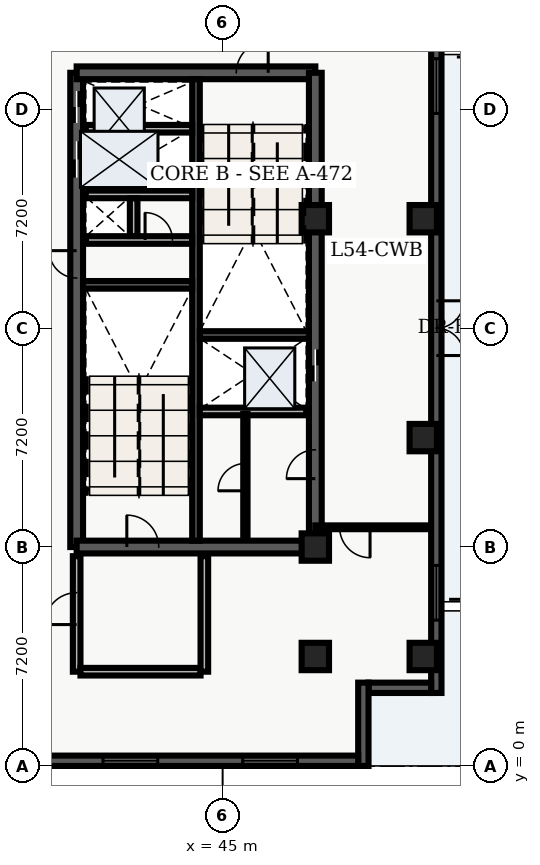
"""IFC4 building model, lengths in metres.
Left out: names, types, materials, properties, quantities, classifications, styles, units other than length and angle.
Written with IfcOpenShell. Run it as: python <this file> out.ifc"""

import sys

from ifc_helpers import new_model, entity, si_unit, converted_unit, direction, frame, origin_with_axes, origin_2d_with_axis, place, context, subcontext, project, spatial, polyline, rectangle, outline, extrude, element, fill, save


model = new_model("IFC4")
c1 = context("Model", 3, precision=1e-05, world=origin_with_axes(), true_north=direction((0.0, 1.0)))
c2 = subcontext(c1, "Body", "Model", "MODEL_VIEW")
j1 = project(units=[si_unit("LENGTHUNIT", "METRE"), converted_unit("PLANEANGLEUNIT", "DEGREE", entity("IfcPlaneAngleMeasure", 0.017), si_unit("PLANEANGLEUNIT", "RADIAN"), dimensions=[0, 0, 0, 0, 0, 0, 0])], contexts=[c1])
p1 = place(None, origin_with_axes())
s1 = spatial("IfcSite", under=j1, at=p1, CompositionType="ELEMENT")
p2 = place(p1, origin_with_axes())
s2 = spatial("IfcBuilding", under=s1, at=p2, CompositionType="ELEMENT")
p3 = place(p2, frame((0.0, 0.0, 219.9), z_axis=(0.0, 0.0, 1.0), x_axis=(1.0, 0.0, 0.0)))
s3 = spatial("IfcBuildingStorey", under=s2, at=p3, CompositionType="ELEMENT", Elevation=219.9)
p4 = place(p3, frame((40.2, 7.2, 0.0), z_axis=(0.0, 0.0, 1.0), x_axis=(0.0, 1.0, 0.0)))
e1 = element("IfcWall", 1, at=p4, inside=s3, PredefinedType="SHEAR", context=c2, shape_type="SweptSolid", body=[
    extrude(outline(polyline([(0.0, -0.21), (15.6, -0.21), (15.6, 0.21), (0.0, 0.21), (0.0, -0.21)])), origin_with_axes(), (0.0, 0.0, 1.0), 4.56),
])
p5 = place(p4, frame((14.475, 0.0, 0.0), z_axis=(0.0, 0.0, 1.0), x_axis=(1.0, 0.0, 0.0)))
e2 = element("IfcOpeningElement", 2, at=p5, cuts=e1, PredefinedType="OPENING", context=c2, shape_type="SweptSolid", body=[
    extrude(rectangle(XDim=1.05, YDim=0.44, at=origin_2d_with_axis()), origin_with_axes(), (0.0, 0.0, 1.0), 2.15),
])
p6 = place(p4, frame((12.75, 0.0, 0.0), z_axis=(0.0, 0.0, 1.0), x_axis=(1.0, 0.0, 0.0)))
e3 = element("IfcOpeningElement", 3, at=p6, cuts=e1, PredefinedType="OPENING", context=c2, shape_type="SweptSolid", body=[
    extrude(rectangle(XDim=1.2, YDim=0.44, at=origin_2d_with_axis()), origin_with_axes(), (0.0, 0.0, 1.0), 2.15),
])
p7 = place(p4, frame((9.3, 0.0, 0.0), z_axis=(0.0, 0.0, 1.0), x_axis=(1.0, 0.0, 0.0)))
e4 = element("IfcOpeningElement", 4, at=p7, cuts=e1, PredefinedType="OPENING", context=c2, shape_type="SweptSolid", body=[
    extrude(rectangle(XDim=0.9, YDim=0.44, at=origin_2d_with_axis()), origin_with_axes(), (0.0, 0.0, 1.0), 2.15),
])
p8 = place(p3, frame((40.2, 7.2, 0.0), z_axis=(0.0, 0.0, 1.0), x_axis=(1.0, 0.0, 0.0)))
e5 = element("IfcWall", 5, at=p8, inside=s3, PredefinedType="SHEAR", context=c2, shape_type="SweptSolid", body=[
    extrude(outline(polyline([(0.0, -0.21), (7.85, -0.21), (7.85, 0.21), (0.0, 0.21), (0.0, -0.21)])), origin_with_axes(), (0.0, 0.0, 1.0), 4.56),
])
p9 = place(p8, frame((2.175, 0.0, 0.0), z_axis=(0.0, 0.0, 1.0), x_axis=(1.0, 0.0, 0.0)))
e6 = element("IfcOpeningElement", 6, at=p9, cuts=e5, PredefinedType="OPENING", context=c2, shape_type="SweptSolid", body=[
    extrude(rectangle(XDim=1.05, YDim=0.44, at=origin_2d_with_axis()), origin_with_axes(), (0.0, 0.0, 1.0), 2.15),
])
p10 = place(p3, frame((40.2, 22.8, 0.0), z_axis=(0.0, 0.0, 1.0), x_axis=(1.0, 0.0, 0.0)))
e7 = element("IfcWall", 7, at=p10, inside=s3, PredefinedType="SHEAR", context=c2, shape_type="SweptSolid", body=[
    extrude(outline(polyline([(0.0, -0.21), (7.85, -0.21), (7.85, 0.21), (0.0, 0.21), (0.0, -0.21)])), origin_with_axes(), (0.0, 0.0, 1.0), 4.56),
])
p11 = place(p10, frame((5.775, 0.0, 0.0), z_axis=(0.0, 0.0, 1.0), x_axis=(1.0, 0.0, 0.0)))
e8 = element("IfcOpeningElement", 8, at=p11, cuts=e7, PredefinedType="OPENING", context=c2, shape_type="SweptSolid", body=[
    extrude(rectangle(XDim=1.05, YDim=0.44, at=origin_2d_with_axis()), origin_with_axes(), (0.0, 0.0, 1.0), 2.15),
])
p12 = place(p3, frame((48.05, 7.2, 0.0), z_axis=(0.0, 0.0, 1.0), x_axis=(0.0, 1.0, 0.0)))
e9 = element("IfcWall", 9, at=p12, inside=s3, PredefinedType="SHEAR", context=c2, shape_type="SweptSolid", body=[
    extrude(outline(polyline([(0.0, -0.21), (15.6, -0.21), (15.6, 0.21), (0.0, 0.21), (0.0, -0.21)])), origin_with_axes(), (0.0, 0.0, 1.0), 4.56),
])
p13 = place(p12, frame((5.975, 0.0, 0.0), z_axis=(0.0, 0.0, 1.0), x_axis=(1.0, 0.0, 0.0)))
e10 = element("IfcOpeningElement", 10, at=p13, cuts=e9, PredefinedType="OPENING", context=c2, shape_type="SweptSolid", body=[
    extrude(rectangle(XDim=1.05, YDim=0.44, at=origin_2d_with_axis()), origin_with_axes(), (0.0, 0.0, 1.0), 2.15),
])
p14 = place(p12, frame((2.725, 0.0, 0.0), z_axis=(0.0, 0.0, 1.0), x_axis=(1.0, 0.0, 0.0)))
e11 = element("IfcOpeningElement", 11, at=p14, cuts=e9, PredefinedType="OPENING", context=c2, shape_type="SweptSolid", body=[
    extrude(rectangle(XDim=0.95, YDim=0.44, at=origin_2d_with_axis()), origin_with_axes(), (0.0, 0.0, 1.0), 2.15),
])
p15 = place(p3, frame((44.125, 7.41, 0.0), z_axis=(0.0, 0.0, 1.0), x_axis=(0.0, 1.0, 0.0)))
e12 = element("IfcWall", 12, at=p15, inside=s3, PredefinedType="SHEAR", context=c2, shape_type="SweptSolid", body=[
    extrude(outline(polyline([(0.0, -0.125), (15.18, -0.125), (15.18, 0.125), (0.0, 0.125), (0.0, -0.125)])), origin_with_axes(), (0.0, 0.0, 1.0), 4.56),
])
for number, where, z_axis, x_axis in (
    (13, (40.41, 15.825, 0.0), (0.0, 0.0, 1.0), (1.0, 0.0, 0.0)),
    (14, (44.25, 14.175, 0.0), (0.0, 0.0, 1.0), (1.0, 0.0, 0.0)),
):
    element("IfcWall", number, at=place(p3, frame(where, z_axis=z_axis, x_axis=x_axis)), inside=s3, PredefinedType="SHEAR", context=c2, shape_type="SweptSolid", body=[
        extrude(outline(polyline([(0.0, -0.125), (3.59, -0.125), (3.59, 0.125), (0.0, 0.125), (0.0, -0.125)])), origin_with_axes(), (0.0, 0.0, 1.0), 4.56),
    ])
p16 = place(p3, frame((40.5, 17.3, 0.0), z_axis=(0.0, 0.0, 1.0), x_axis=(1.0, 0.0, 0.0)))
e15 = element("IfcWall", 15, at=p16, inside=s3, PredefinedType="SOLIDWALL", context=c2, shape_type="SweptSolid", body=[
    extrude(outline(polyline([(0.0, -0.125), (3.5, -0.125), (3.5, 0.125), (0.0, 0.125), (0.0, -0.125)])), origin_with_axes(), (0.0, 0.0, 1.0), 3.6),
])
p17 = place(p16, frame((2.4, 0.0, 0.0), z_axis=(0.0, 0.0, 1.0), x_axis=(1.0, 0.0, 0.0)))
e16 = element("IfcOpeningElement", 16, at=p17, cuts=e15, PredefinedType="OPENING", context=c2, shape_type="SweptSolid", body=[
    extrude(rectangle(XDim=0.9, YDim=0.27, at=origin_2d_with_axis()), origin_with_axes(), (0.0, 0.0, 1.0), 2.15),
])
p18 = place(p3, frame((40.5, 18.8, 0.0), z_axis=(0.0, 0.0, 1.0), x_axis=(1.0, 0.0, 0.0)))
e17 = element("IfcWall", 17, at=p18, inside=s3, PredefinedType="SOLIDWALL", context=c2, shape_type="SweptSolid", body=[
    extrude(outline(polyline([(0.0, -0.125), (3.5, -0.125), (3.5, 0.125), (0.0, 0.125), (0.0, -0.125)])), origin_with_axes(), (0.0, 0.0, 1.0), 3.6),
])
p19 = place(p3, frame((42.075, 17.43, 0.0), z_axis=(0.0, 0.0, 1.0), x_axis=(0.0, 1.0, 0.0)))
e18 = element("IfcWall", 18, at=p19, inside=s3, PredefinedType="SOLIDWALL", context=c2, shape_type="SweptSolid", body=[
    extrude(outline(polyline([(0.0, -0.125), (1.24, -0.125), (1.24, 0.125), (0.0, 0.125), (0.0, -0.125)])), origin_with_axes(), (0.0, 0.0, 1.0), 3.6),
])
p20 = place(p3, frame((40.2, 3.1, 0.0), z_axis=(0.0, 0.0, 1.0), x_axis=(0.0, 1.0, 0.0)))
e19 = element("IfcWall", 19, at=p20, inside=s3, PredefinedType="SOLIDWALL", context=c2, shape_type="SweptSolid", body=[
    extrude(outline(polyline([(0.0, -0.125), (3.8, -0.125), (3.8, 0.125), (0.0, 0.125), (0.0, -0.125)])), origin_with_axes(), (0.0, 0.0, 1.0), 3.6),
])
p21 = place(p20, frame((2.075, 0.0, 0.0), z_axis=(0.0, 0.0, 1.0), x_axis=(1.0, 0.0, 0.0)))
e20 = element("IfcOpeningElement", 20, at=p21, cuts=e19, PredefinedType="OPENING", context=c2, shape_type="SweptSolid", body=[
    extrude(rectangle(XDim=1.05, YDim=0.27, at=origin_2d_with_axis()), origin_with_axes(), (0.0, 0.0, 1.0), 2.15),
])
p22 = place(p3, frame((40.325, 3.1, 0.0), z_axis=(0.0, 0.0, 1.0), x_axis=(1.0, 0.0, 0.0)))
e21 = element("IfcWall", 21, at=p22, inside=s3, PredefinedType="SOLIDWALL", context=c2, shape_type="SweptSolid", body=[
    extrude(outline(polyline([(0.0, -0.125), (3.95, -0.125), (3.95, 0.125), (0.0, 0.125), (0.0, -0.125)])), origin_with_axes(), (0.0, 0.0, 1.0), 3.6),
])
p23 = place(p3, frame((44.4, 3.1, 0.0), z_axis=(0.0, 0.0, 1.0), x_axis=(0.0, 1.0, 0.0)))
e22 = element("IfcWall", 22, at=p23, inside=s3, PredefinedType="SOLIDWALL", context=c2, shape_type="SweptSolid", body=[
    extrude(outline(polyline([(0.0, -0.125), (3.8, -0.125), (3.8, 0.125), (0.0, 0.125), (0.0, -0.125)])), origin_with_axes(), (0.0, 0.0, 1.0), 3.6),
])
for number, where, z_axis, x_axis in (
    (23, (48.05, 3.6, 0.0), (0.0, 0.0, 1.0), (1.0, 0.0, 0.0)),
    (24, (48.05, 7.2, 0.0), (0.0, 0.0, 1.0), (1.0, 0.0, 0.0)),
    (25, (48.05, 18.0, 0.0), (0.0, 0.0, 1.0), (1.0, 0.0, 0.0)),
    (26, (51.6, 3.6, 0.0), (0.0, 0.0, 1.0), (1.0, 0.0, 0.0)),
    (27, (51.6, 10.8, 0.0), (0.0, 0.0, 1.0), (1.0, 0.0, 0.0)),
    (28, (51.6, 18.0, 0.0), (0.0, 0.0, 1.0), (1.0, 0.0, 0.0)),
):
    element("IfcColumn", number, at=place(p3, frame(where, z_axis=z_axis, x_axis=x_axis)), inside=s3, PredefinedType="COLUMN", context=c2, shape_type="SweptSolid", body=[
        extrude(rectangle(XDim=0.9, YDim=0.9, at=origin_2d_with_axis()), origin_with_axes(), (0.0, 0.0, 1.0), 4.8),
    ])
for number, where, z_axis, x_axis in (
    (29, (40.5, 20.96, 0.0), (0.0, 0.0, 1.0), (1.0, 0.0, 0.0)),
    (30, (44.25, 11.66, 0.0), (0.0, 0.0, 1.0), (1.0, 0.0, 0.0)),
):
    element("IfcWall", number, at=place(p3, frame(where, z_axis=z_axis, x_axis=x_axis)), inside=s3, PredefinedType="SOLIDWALL", context=c2, shape_type="SweptSolid", body=[
        extrude(outline(polyline([(0.0, -0.125), (3.5, -0.125), (3.5, 0.125), (0.0, 0.125), (0.0, -0.125)])), origin_with_axes(), (0.0, 0.0, 1.0), 3.2),
    ])
p24 = place(p3, frame((45.75, 7.5, 0.0), z_axis=(0.0, 0.0, 1.0), x_axis=(0.0, 1.0, 0.0)))
e31 = element("IfcWall", 31, at=p24, inside=s3, PredefinedType="PARTITIONING", context=c2, shape_type="SweptSolid", body=[
    extrude(outline(polyline([(0.0, -0.07), (4.08, -0.07), (4.08, 0.07), (0.0, 0.07), (0.0, -0.07)])), origin_with_axes(), (0.0, 0.0, 1.0), 3.2),
])
p25 = place(p24, frame((2.0, 0.0, 0.0), z_axis=(0.0, 0.0, 1.0), x_axis=(1.0, 0.0, 0.0)))
e32 = element("IfcOpeningElement", 32, at=p25, cuts=e31, PredefinedType="OPENING", context=c2, shape_type="SweptSolid", body=[
    extrude(rectangle(XDim=0.9, YDim=0.16, at=origin_2d_with_axis()), origin_with_axes(), (0.0, 0.0, 1.0), 2.15),
])
p26 = place(p3, frame((51.865, 7.85, 0.0), z_axis=(0.0, 0.0, 1.0), x_axis=(-1.0, 0.0, 0.0)))
e33 = element("IfcWall", 33, at=p26, inside=s3, PredefinedType="PARTITIONING", context=c2, shape_type="SweptSolid", body=[
    extrude(outline(polyline([(0.0, -0.062), (3.815, -0.062), (3.815, 0.062), (0.0, 0.062), (0.0, -0.062)])), origin_with_axes(), (0.0, 0.0, 1.0), 3.2),
])
p27 = place(p26, frame((2.515, 0.0, 0.0), z_axis=(0.0, 0.0, 1.0), x_axis=(1.0, 0.0, 0.0)))
e34 = element("IfcOpeningElement", 34, at=p27, cuts=e33, PredefinedType="OPENING", context=c2, shape_type="SweptSolid", body=[
    extrude(rectangle(XDim=1.0, YDim=0.145, at=origin_2d_with_axis()), origin_with_axes(), (0.0, 0.0, 1.0), 2.15),
])
p28 = place(p3, frame((52.03, 26.06, 0.0), z_axis=(0.0, 0.0, 1.0), x_axis=(0.0, -1.0, 0.0)))
e35 = element("IfcWall", 35, at=p28, inside=s3, PredefinedType="SOLIDWALL", context=c2, shape_type="SweptSolid", body=[
    extrude(outline(polyline([(0.0, -0.17), (23.66, -0.17), (23.66, 0.17), (0.0, 0.17), (0.0, -0.17)])), origin_with_axes(), (0.0, 0.0, 1.0), 4.56),
])
p29 = place(p28, frame((11.66, 0.0, 0.0), z_axis=(0.0, 0.0, 1.0), x_axis=(1.0, 0.0, 0.0)))
e36 = element("IfcOpeningElement", 36, at=p29, cuts=e35, PredefinedType="OPENING", context=c2, shape_type="SweptSolid", body=[
    extrude(rectangle(XDim=1.8, YDim=0.36, at=origin_2d_with_axis()), origin_with_axes(), (0.0, 0.0, 1.0), 2.3),
])
p30 = place(p28, frame((3.696, 0.0, 0.45), z_axis=(0.0, 0.0, 1.0), x_axis=(1.0, 0.0, 0.0)))
e37 = element("IfcOpeningElement", 37, at=p30, cuts=e35, PredefinedType="OPENING", context=c2, shape_type="SweptSolid", body=[
    extrude(rectangle(XDim=1.8, YDim=0.36, at=origin_2d_with_axis()), origin_with_axes(), (0.0, 0.0, 1.0), 2.1),
])
p31 = place(p28, frame((20.364, 0.0, 0.45), z_axis=(0.0, 0.0, 1.0), x_axis=(1.0, 0.0, 0.0)))
e38 = element("IfcOpeningElement", 38, at=p31, cuts=e35, PredefinedType="OPENING", context=c2, shape_type="SweptSolid", body=[
    extrude(rectangle(XDim=1.8, YDim=0.36, at=origin_2d_with_axis()), origin_with_axes(), (0.0, 0.0, 1.0), 2.1),
])
p32 = place(p3, frame((51.86, 2.57, 0.0), z_axis=(0.0, 0.0, 1.0), x_axis=(-1.0, 0.0, 0.0)))
e39 = element("IfcWall", 39, at=p32, inside=s3, PredefinedType="SOLIDWALL", context=c2, shape_type="SweptSolid", body=[
    extrude(outline(polyline([(0.0, -0.17), (2.06, -0.17), (2.06, 0.17), (0.0, 0.17), (0.0, -0.17)])), origin_with_axes(), (0.0, 0.0, 1.0), 4.56),
])
p33 = place(p3, frame((49.63, 2.74, 0.0), z_axis=(0.0, 0.0, 1.0), x_axis=(0.0, -1.0, 0.0)))
e40 = element("IfcWall", 40, at=p33, inside=s3, PredefinedType="SOLIDWALL", context=c2, shape_type="SweptSolid", body=[
    extrude(outline(polyline([(0.0, -0.17), (2.74, -0.17), (2.74, 0.17), (0.0, 0.17), (0.0, -0.17)])), origin_with_axes(), (0.0, 0.0, 1.0), 4.56),
])
p34 = place(p3, frame((49.46, 0.17, 0.0), z_axis=(0.0, 0.0, 1.0), x_axis=(-1.0, 0.0, 0.0)))
e41 = element("IfcWall", 41, at=p34, inside=s3, PredefinedType="SOLIDWALL", context=c2, shape_type="SweptSolid", body=[
    extrude(outline(polyline([(0.0, -0.17), (42.56, -0.17), (42.56, 0.17), (0.0, 0.17), (0.0, -0.17)])), origin_with_axes(), (0.0, 0.0, 1.0), 4.56),
])
p35 = place(p34, frame((2.898, 0.0, 0.45), z_axis=(0.0, 0.0, 1.0), x_axis=(1.0, 0.0, 0.0)))
e42 = element("IfcOpeningElement", 42, at=p35, cuts=e41, PredefinedType="OPENING", context=c2, shape_type="SweptSolid", body=[
    extrude(rectangle(XDim=1.8, YDim=0.36, at=origin_2d_with_axis()), origin_with_axes(), (0.0, 0.0, 1.0), 2.1),
])
p36 = place(p34, frame((7.493, 0.0, 0.45), z_axis=(0.0, 0.0, 1.0), x_axis=(1.0, 0.0, 0.0)))
e43 = element("IfcOpeningElement", 43, at=p36, cuts=e41, PredefinedType="OPENING", context=c2, shape_type="SweptSolid", body=[
    extrude(rectangle(XDim=1.8, YDim=0.36, at=origin_2d_with_axis()), origin_with_axes(), (0.0, 0.0, 1.0), 2.1),
])
p37 = place(p34, frame((12.089, 0.0, 0.45), z_axis=(0.0, 0.0, 1.0), x_axis=(1.0, 0.0, 0.0)))
e44 = element("IfcOpeningElement", 44, at=p37, cuts=e41, PredefinedType="OPENING", context=c2, shape_type="SweptSolid", body=[
    extrude(rectangle(XDim=1.8, YDim=0.36, at=origin_2d_with_axis()), origin_with_axes(), (0.0, 0.0, 1.0), 2.1),
])
p38 = place(p34, frame((16.684, 0.0, 0.45), z_axis=(0.0, 0.0, 1.0), x_axis=(1.0, 0.0, 0.0)))
e45 = element("IfcOpeningElement", 45, at=p38, cuts=e41, PredefinedType="OPENING", context=c2, shape_type="SweptSolid", body=[
    extrude(rectangle(XDim=1.8, YDim=0.36, at=origin_2d_with_axis()), origin_with_axes(), (0.0, 0.0, 1.0), 2.1),
])
p39 = place(p34, frame((21.28, 0.0, 0.45), z_axis=(0.0, 0.0, 1.0), x_axis=(1.0, 0.0, 0.0)))
e46 = element("IfcOpeningElement", 46, at=p39, cuts=e41, PredefinedType="OPENING", context=c2, shape_type="SweptSolid", body=[
    extrude(rectangle(XDim=1.8, YDim=0.36, at=origin_2d_with_axis()), origin_with_axes(), (0.0, 0.0, 1.0), 2.1),
])
p40 = place(p34, frame((25.876, 0.0, 0.45), z_axis=(0.0, 0.0, 1.0), x_axis=(1.0, 0.0, 0.0)))
e47 = element("IfcOpeningElement", 47, at=p40, cuts=e41, PredefinedType="OPENING", context=c2, shape_type="SweptSolid", body=[
    extrude(rectangle(XDim=1.8, YDim=0.36, at=origin_2d_with_axis()), origin_with_axes(), (0.0, 0.0, 1.0), 2.1),
])
p41 = place(p34, frame((30.471, 0.0, 0.45), z_axis=(0.0, 0.0, 1.0), x_axis=(1.0, 0.0, 0.0)))
e48 = element("IfcOpeningElement", 48, at=p41, cuts=e41, PredefinedType="OPENING", context=c2, shape_type="SweptSolid", body=[
    extrude(rectangle(XDim=1.8, YDim=0.36, at=origin_2d_with_axis()), origin_with_axes(), (0.0, 0.0, 1.0), 2.1),
])
p42 = place(p34, frame((34.617, 0.0, 0.45), z_axis=(0.0, 0.0, 1.0), x_axis=(1.0, 0.0, 0.0)))
e49 = element("IfcOpeningElement", 49, at=p42, cuts=e41, PredefinedType="OPENING", context=c2, shape_type="SweptSolid", body=[
    extrude(rectangle(XDim=1.8, YDim=0.36, at=origin_2d_with_axis()), origin_with_axes(), (0.0, 0.0, 1.0), 2.1),
])
p43 = place(p34, frame((39.662, 0.0, 0.45), z_axis=(0.0, 0.0, 1.0), x_axis=(1.0, 0.0, 0.0)))
e50 = element("IfcOpeningElement", 50, at=p43, cuts=e41, PredefinedType="OPENING", context=c2, shape_type="SweptSolid", body=[
    extrude(rectangle(XDim=1.8, YDim=0.36, at=origin_2d_with_axis()), origin_with_axes(), (0.0, 0.0, 1.0), 2.1),
])
p44 = place(p12, frame((5.975, 0.0, 0.0), z_axis=(0.0, 0.0, 1.0), x_axis=(1.0, 0.0, 0.0)))
e51 = element("IfcDoor", 51, at=p44, inside=s3, OperationType="SLIDING_TO_LEFT", PredefinedType="DOOR", context=c2, shape_type="SweptSolid", body=[
    extrude(rectangle(XDim=1.05, YDim=0.09, at=origin_2d_with_axis()), origin_with_axes(), (0.0, 0.0, 1.0), 2.15),
])
fill(e10, e51)
p45 = place(p4, frame((14.475, 0.0, 0.0), z_axis=(0.0, 0.0, 1.0), x_axis=(1.0, 0.0, 0.0)))
e52 = element("IfcDoor", 52, at=p45, inside=s3, OperationType="SLIDING_TO_RIGHT", PredefinedType="DOOR", context=c2, shape_type="SweptSolid", body=[
    extrude(rectangle(XDim=1.05, YDim=0.09, at=origin_2d_with_axis()), origin_with_axes(), (0.0, 0.0, 1.0), 2.15),
])
fill(e2, e52)
p46 = place(p4, frame((12.75, 0.0, 0.0), z_axis=(0.0, 0.0, 1.0), x_axis=(1.0, 0.0, 0.0)))
e53 = element("IfcDoor", 53, at=p46, inside=s3, OperationType="DOUBLE_DOOR_SLIDING", PredefinedType="DOOR", context=c2, shape_type="SweptSolid", body=[
    extrude(rectangle(XDim=1.2, YDim=0.09, at=origin_2d_with_axis()), origin_with_axes(), (0.0, 0.0, 1.0), 2.15),
])
fill(e3, e53)
p47 = place(p4, frame((9.3, 0.0, 0.0), z_axis=(0.0, 0.0, 1.0), x_axis=(1.0, 0.0, 0.0)))
e54 = element("IfcDoor", 54, at=p47, inside=s3, OperationType="SINGLE_SWING_RIGHT", PredefinedType="DOOR", context=c2, shape_type="SweptSolid", body=[
    extrude(rectangle(XDim=0.9, YDim=0.09, at=origin_2d_with_axis()), origin_with_axes(), (0.0, 0.0, 1.0), 2.15),
])
fill(e4, e54)
p48 = place(p16, frame((2.4, 0.0, 0.0), z_axis=(0.0, 0.0, 1.0), x_axis=(1.0, 0.0, 0.0)))
e55 = element("IfcDoor", 55, at=p48, inside=s3, OperationType="SINGLE_SWING_LEFT", PredefinedType="DOOR", context=c2, shape_type="SweptSolid", body=[
    extrude(rectangle(XDim=0.9, YDim=0.09, at=origin_2d_with_axis()), origin_with_axes(), (0.0, 0.0, 1.0), 2.15),
])
fill(e16, e55)
p49 = place(p8, frame((2.175, 0.0, 0.0), z_axis=(0.0, 0.0, 1.0), x_axis=(1.0, 0.0, 0.0)))
e56 = element("IfcDoor", 56, at=p49, inside=s3, OperationType="SINGLE_SWING_LEFT", PredefinedType="DOOR", context=c2, shape_type="SweptSolid", body=[
    extrude(rectangle(XDim=1.05, YDim=0.09, at=origin_2d_with_axis()), origin_with_axes(), (0.0, 0.0, 1.0), 2.15),
])
fill(e6, e56)
p50 = place(p10, frame((5.775, 0.0, 0.0), z_axis=(0.0, 0.0, 1.0), x_axis=(1.0, 0.0, 0.0)))
e57 = element("IfcDoor", 57, at=p50, inside=s3, OperationType="SINGLE_SWING_RIGHT", PredefinedType="DOOR", context=c2, shape_type="SweptSolid", body=[
    extrude(rectangle(XDim=1.05, YDim=0.09, at=origin_2d_with_axis()), origin_with_axes(), (0.0, 0.0, 1.0), 2.15),
])
fill(e8, e57)
p51 = place(p20, frame((2.075, 0.0, 0.0), z_axis=(0.0, 0.0, 1.0), x_axis=(1.0, 0.0, 0.0)))
e58 = element("IfcDoor", 58, at=p51, inside=s3, OperationType="SINGLE_SWING_LEFT", PredefinedType="DOOR", context=c2, shape_type="SweptSolid", body=[
    extrude(rectangle(XDim=1.05, YDim=0.09, at=origin_2d_with_axis()), origin_with_axes(), (0.0, 0.0, 1.0), 2.15),
])
fill(e20, e58)
p52 = place(p24, frame((2.0, 0.0, 0.0), z_axis=(0.0, 0.0, 1.0), x_axis=(1.0, 0.0, 0.0)))
e59 = element("IfcDoor", 59, at=p52, inside=s3, OperationType="SINGLE_SWING_LEFT", PredefinedType="DOOR", context=c2, shape_type="SweptSolid", body=[
    extrude(rectangle(XDim=0.9, YDim=0.084, at=origin_2d_with_axis()), origin_with_axes(), (0.0, 0.0, 1.0), 2.15),
])
fill(e32, e59)
p53 = place(p12, frame((2.725, 0.0, 0.0), z_axis=(0.0, 0.0, 1.0), x_axis=(1.0, 0.0, 0.0)))
e60 = element("IfcDoor", 60, at=p53, inside=s3, OperationType="SINGLE_SWING_LEFT", PredefinedType="DOOR", context=c2, shape_type="SweptSolid", body=[
    extrude(rectangle(XDim=0.95, YDim=0.09, at=origin_2d_with_axis()), origin_with_axes(), (0.0, 0.0, 1.0), 2.15),
])
fill(e11, e60)
p54 = place(p26, frame((2.515, 0.0, 0.0), z_axis=(0.0, 0.0, 1.0), x_axis=(1.0, 0.0, 0.0)))
e61 = element("IfcDoor", 61, at=p54, inside=s3, OperationType="SINGLE_SWING_LEFT", PredefinedType="DOOR", context=c2, shape_type="SweptSolid", body=[
    extrude(rectangle(XDim=1.0, YDim=0.075, at=origin_2d_with_axis()), origin_with_axes(), (0.0, 0.0, 1.0), 2.15),
])
fill(e34, e61)
p55 = place(p28, frame((11.66, 0.0, 0.0), z_axis=(0.0, 0.0, 1.0), x_axis=(1.0, 0.0, 0.0)))
e62 = element("IfcDoor", 62, at=p55, inside=s3, OperationType="DOUBLE_DOOR_SINGLE_SWING", PredefinedType="DOOR", context=c2, shape_type="SweptSolid", body=[
    extrude(rectangle(XDim=1.8, YDim=0.09, at=origin_2d_with_axis()), origin_with_axes(), (0.0, 0.0, 1.0), 2.3),
])
fill(e36, e62)
p56 = place(p28, frame((3.696, 0.0, 0.45), z_axis=(0.0, 0.0, 1.0), x_axis=(1.0, 0.0, 0.0)))
e63 = element("IfcWindow", 63, at=p56, inside=s3, PredefinedType="WINDOW", context=c2, shape_type="SweptSolid", body=[
    extrude(rectangle(XDim=1.8, YDim=0.09, at=origin_2d_with_axis()), origin_with_axes(), (0.0, 0.0, 1.0), 2.1),
])
fill(e37, e63)
p57 = place(p28, frame((20.364, 0.0, 0.45), z_axis=(0.0, 0.0, 1.0), x_axis=(1.0, 0.0, 0.0)))
e64 = element("IfcWindow", 64, at=p57, inside=s3, PredefinedType="WINDOW", context=c2, shape_type="SweptSolid", body=[
    extrude(rectangle(XDim=1.8, YDim=0.09, at=origin_2d_with_axis()), origin_with_axes(), (0.0, 0.0, 1.0), 2.1),
])
fill(e38, e64)
p58 = place(p34, frame((2.898, 0.0, 0.45), z_axis=(0.0, 0.0, 1.0), x_axis=(1.0, 0.0, 0.0)))
e65 = element("IfcWindow", 65, at=p58, inside=s3, PredefinedType="WINDOW", context=c2, shape_type="SweptSolid", body=[
    extrude(rectangle(XDim=1.8, YDim=0.09, at=origin_2d_with_axis()), origin_with_axes(), (0.0, 0.0, 1.0), 2.1),
])
fill(e42, e65)
p59 = place(p34, frame((7.493, 0.0, 0.45), z_axis=(0.0, 0.0, 1.0), x_axis=(1.0, 0.0, 0.0)))
e66 = element("IfcWindow", 66, at=p59, inside=s3, PredefinedType="WINDOW", context=c2, shape_type="SweptSolid", body=[
    extrude(rectangle(XDim=1.8, YDim=0.09, at=origin_2d_with_axis()), origin_with_axes(), (0.0, 0.0, 1.0), 2.1),
])
fill(e43, e66)
save(model, sys.argv[1])
